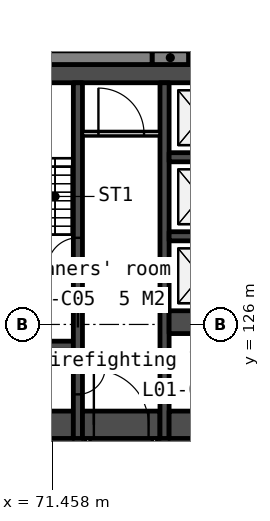
"""IFC4 building model, lengths in metres.
Left out: names, types, materials, properties, quantities, classifications, styles, units other than length and angle.
Written with IfcOpenShell. Run it as: python <this file> out.ifc"""

import sys

from ifc_helpers import new_model, si_unit, direction, frame, frame_2d, origin, place, context, subcontext, project, spatial, rectangle, extrude, element, fill, save


model = new_model("IFC4")
c1 = context("Model", 3, precision=1e-05, world=origin(), true_north=direction((0.0, 1.0)))
c2 = subcontext(c1, "Body", "Model", "MODEL_VIEW")
j1 = project(units=[si_unit("LENGTHUNIT", "METRE"), si_unit("PLANEANGLEUNIT", "RADIAN")], contexts=[c1])
p1 = place(None, origin())
s1 = spatial("IfcSite", under=j1, at=p1, CompositionType="ELEMENT")
p2 = place(p1, origin())
s2 = spatial("IfcBuilding", under=s1, at=p2, CompositionType="ELEMENT")
p3 = place(p2, frame((0.0, 0.0, 7.5)))
s3 = spatial("IfcBuildingStorey", under=s2, at=p3, CompositionType="ELEMENT", Elevation=7.5)
p4 = place(p3, frame((66.0, 134.25, 0.0), z_axis=(0.0, 0.0, 1.0), x_axis=(1.0, 0.0, 0.0)))
e1 = element("IfcWall", 1, at=p4, inside=s3, PredefinedType="SOLIDWALL", context=c2, shape_type="SweptSolid", body=[
    extrude(rectangle(XDim=28.0, YDim=0.6, at=frame_2d((14.0, 0.0))), origin(), (0.0, 0.0, 1.0), 5.7),
])
for number, where, z_axis, x_axis in (
    (2, (69.6, 127.6, 0.0), (0.0, 0.0, 1.0), (1.0, 0.0, 0.0)),
    (3, (69.6, 125.3, 0.0), (0.0, 0.0, 1.0), (1.0, 0.0, 0.0)),
):
    element("IfcWall", number, at=place(p3, frame(where, z_axis=z_axis, x_axis=x_axis)), inside=s3, PredefinedType="SOLIDWALL", context=c2, shape_type="SweptSolid", body=[
        extrude(rectangle(XDim=2.55, YDim=0.3, at=frame_2d((1.275, 0.0))), origin(), (0.0, 0.0, 1.0), 5.7),
    ])
p5 = place(p3, frame((69.6, 122.7, 0.0), z_axis=(0.0, 0.0, 1.0), x_axis=(1.0, 0.0, 0.0)))
e4 = element("IfcWall", 4, at=p5, inside=s3, PredefinedType="SOLIDWALL", context=c2, shape_type="SweptSolid", body=[
    extrude(rectangle(XDim=2.55, YDim=0.9, at=frame_2d((1.275, 0.0))), origin(), (0.0, 0.0, 1.0), 5.7),
])
p6 = place(p3, frame((72.3, 133.95, 0.0), z_axis=(0.0, 0.0, 1.0), x_axis=(0.0, -1.0, 0.0)))
e5 = element("IfcWall", 5, at=p6, inside=s3, PredefinedType="SOLIDWALL", context=c2, shape_type="SweptSolid", body=[
    extrude(rectangle(XDim=11.7, YDim=0.3, at=frame_2d((5.85, 0.0))), origin(), (0.0, 0.0, 1.0), 5.7),
])
p7 = place(p6, frame((6.95, 0.0, 0.0)))
e6 = element("IfcOpeningElement", 6, at=p7, cuts=e5, PredefinedType="OPENING", context=c2, shape_type="SweptSolid", body=[
    extrude(rectangle(XDim=1.1, YDim=2.1, at=frame_2d((0.55, 1.05))), frame((0.0, 0.16, 0.0), z_axis=(0.0, -1.0, 0.0), x_axis=(1.0, 0.0, 0.0)), (0.0, 0.0, 1.0), 0.32),
])
p8 = place(p6, frame((9.35, 0.0, 0.0)))
e7 = element("IfcOpeningElement", 7, at=p8, cuts=e5, PredefinedType="OPENING", context=c2, shape_type="SweptSolid", body=[
    extrude(rectangle(XDim=0.9, YDim=2.1, at=frame_2d((0.45, 1.05))), frame((0.0, 0.16, 0.0), z_axis=(0.0, -1.0, 0.0), x_axis=(1.0, 0.0, 0.0)), (0.0, 0.0, 1.0), 0.32),
])
p9 = place(p6, frame((5.1, 0.0, 0.0)))
e8 = element("IfcOpeningElement", 8, at=p9, cuts=e5, PredefinedType="OPENING", context=c2, shape_type="SweptSolid", body=[
    extrude(rectangle(XDim=1.0, YDim=2.1, at=frame_2d((0.5, 1.05))), frame((0.0, 0.16, 0.0), z_axis=(0.0, -1.0, 0.0), x_axis=(1.0, 0.0, 0.0)), (0.0, 0.0, 1.0), 0.32),
])
p10 = place(p3, frame((72.45, 132.275, 0.0), z_axis=(0.0, 0.0, 1.0), x_axis=(1.0, 0.0, 0.0)))
e9 = element("IfcWall", 9, at=p10, inside=s3, PredefinedType="PARTITIONING", context=c2, shape_type="SweptSolid", body=[
    extrude(rectangle(XDim=2.55, YDim=0.15, at=frame_2d((1.275, 0.0))), origin(), (0.0, 0.0, 1.0), 5.7),
])
p11 = place(p10, frame((0.525, 0.0, 0.0)))
e10 = element("IfcOpeningElement", 10, at=p11, cuts=e9, PredefinedType="OPENING", context=c2, shape_type="SweptSolid", body=[
    extrude(rectangle(XDim=1.5, YDim=2.1, at=frame_2d((0.75, 1.05))), frame((0.0, 0.085, 0.0), z_axis=(0.0, -1.0, 0.0), x_axis=(1.0, 0.0, 0.0)), (0.0, 0.0, 1.0), 0.17),
])
p12 = place(p3, frame((72.45, 122.7, 0.0), z_axis=(0.0, 0.0, 1.0), x_axis=(1.0, 0.0, 0.0)))
e11 = element("IfcWall", 11, at=p12, inside=s3, PredefinedType="SOLIDWALL", context=c2, shape_type="SweptSolid", body=[
    extrude(rectangle(XDim=2.55, YDim=0.9, at=frame_2d((1.275, 0.0))), origin(), (0.0, 0.0, 1.0), 5.7),
])
p13 = place(p12, frame((0.375, 0.0, 0.0)))
e12 = element("IfcOpeningElement", 12, at=p13, cuts=e11, PredefinedType="OPENING", context=c2, shape_type="SweptSolid", body=[
    extrude(rectangle(XDim=1.8, YDim=2.1, at=frame_2d((0.9, 1.05))), frame((0.0, 0.46, 0.0), z_axis=(0.0, -1.0, 0.0), x_axis=(1.0, 0.0, 0.0)), (0.0, 0.0, 1.0), 0.92),
])
for number, where, z_axis, x_axis in (
    (13, (72.625, 122.25, 0.0), (0.0, 0.0, 1.0), (0.0, -1.0, 0.0)),
    (14, (74.825, 122.25, 0.0), (0.0, 0.0, 1.0), (0.0, -1.0, 0.0)),
):
    element("IfcWall", number, at=place(p3, frame(where, z_axis=z_axis, x_axis=x_axis)), inside=s3, PredefinedType="PARTITIONING", context=c2, shape_type="SweptSolid", body=[
        extrude(rectangle(XDim=2.1, YDim=0.15, at=frame_2d((1.05, 0.0))), origin(), (0.0, 0.0, 1.0), 5.7),
    ])
p14 = place(p3, frame((75.15, 133.95, 0.0), z_axis=(0.0, 0.0, 1.0), x_axis=(0.0, -1.0, 0.0)))
e15 = element("IfcWall", 15, at=p14, inside=s3, PredefinedType="SOLIDWALL", context=c2, shape_type="SweptSolid", body=[
    extrude(rectangle(XDim=11.7, YDim=0.3, at=frame_2d((5.85, 0.0))), origin(), (0.0, 0.0, 1.0), 5.7),
])
for number, where, z_axis, x_axis in (
    (16, (75.3, 131.5, 0.0), (0.0, 0.0, 1.0), (1.0, 0.0, 0.0)),
    (17, (75.3, 128.9, 0.0), (0.0, 0.0, 1.0), (1.0, 0.0, 0.0)),
):
    element("IfcWall", number, at=place(p3, frame(where, z_axis=z_axis, x_axis=x_axis)), inside=s3, PredefinedType="SOLIDWALL", context=c2, shape_type="SweptSolid", body=[
        extrude(rectangle(XDim=2.1, YDim=0.3, at=frame_2d((1.05, 0.0))), origin(), (0.0, 0.0, 1.0), 5.7),
    ])
p15 = place(p3, frame((75.3, 126.075, 0.0), z_axis=(0.0, 0.0, 1.0), x_axis=(1.0, 0.0, 0.0)))
e18 = element("IfcWall", 18, at=p15, inside=s3, PredefinedType="SOLIDWALL", context=c2, shape_type="SweptSolid", body=[
    extrude(rectangle(XDim=2.1, YDim=0.75, at=frame_2d((1.05, 0.0))), origin(), (0.0, 0.0, 1.0), 5.7),
])
p16 = place(p3, frame((75.3, 122.7, 0.0), z_axis=(0.0, 0.0, 1.0), x_axis=(1.0, 0.0, 0.0)))
e19 = element("IfcWall", 19, at=p16, inside=s3, PredefinedType="SOLIDWALL", context=c2, shape_type="SweptSolid", body=[
    extrude(rectangle(XDim=6.2, YDim=0.9, at=frame_2d((3.1, 0.0))), origin(), (0.0, 0.0, 1.0), 5.7),
])
p17 = place(p3, frame((84.061, 134.775, -0.3), z_axis=(0.0, 0.0, 1.0), x_axis=(-1.0, 0.0, 0.0)))
e20 = element("IfcWall", 20, at=p17, inside=s3, PredefinedType="SOLIDWALL", context=c2, shape_type="SweptSolid", body=[
    extrude(rectangle(XDim=8.122, YDim=0.45, at=frame_2d((4.061, 0.0))), origin(), (0.0, 0.0, 1.0), 5.312),
])
p18 = place(p3, frame((75.939, 134.775, -0.3), z_axis=(0.0, 0.0, 1.0), x_axis=(-1.0, 0.0, 0.0)))
e21 = element("IfcWall", 21, at=p18, inside=s3, PredefinedType="SOLIDWALL", context=c2, shape_type="SweptSolid", body=[
    extrude(rectangle(XDim=1.2, YDim=0.45, at=frame_2d((0.6, 0.0))), origin(), (0.0, 0.0, 1.0), 5.312),
])
p19 = place(p3, frame((74.739, 134.775, -0.3), z_axis=(0.0, 0.0, 1.0), x_axis=(-1.0, 0.0, 0.0)))
e22 = element("IfcWall", 22, at=p19, inside=s3, PredefinedType="SOLIDWALL", context=c2, shape_type="SweptSolid", body=[
    extrude(rectangle(XDim=8.121, YDim=0.45, at=frame_2d((4.061, 0.0))), origin(), (0.0, 0.0, 1.0), 5.312),
])
p20 = place(p7, origin())
e23 = element("IfcDoor", 23, at=p20, inside=s3, OperationType="SLIDING_TO_LEFT", PredefinedType="DOOR", context=c2, shape_type="SweptSolid", body=[
    extrude(rectangle(XDim=1.1, YDim=2.1, at=frame_2d((0.55, 1.05))), frame((0.0, 0.025, 0.0), z_axis=(0.0, -1.0, 0.0), x_axis=(1.0, 0.0, 0.0)), (0.0, 0.0, 1.0), 0.05),
])
fill(e6, e23)
p21 = place(p13, origin())
e24 = element("IfcDoor", 24, at=p21, inside=s3, OperationType="DOUBLE_DOOR_DOUBLE_SWING", PredefinedType="DOOR", context=c2, shape_type="SweptSolid", body=[
    extrude(rectangle(XDim=1.8, YDim=2.1, at=frame_2d((0.9, 1.05))), frame((0.0, 0.025, 0.0), z_axis=(0.0, -1.0, 0.0), x_axis=(1.0, 0.0, 0.0)), (0.0, 0.0, 1.0), 0.05),
])
fill(e12, e24)
p22 = place(p11, origin())
e25 = element("IfcDoor", 25, at=p22, inside=s3, OperationType="DOUBLE_DOOR_DOUBLE_SWING", PredefinedType="DOOR", context=c2, shape_type="SweptSolid", body=[
    extrude(rectangle(XDim=1.5, YDim=2.1, at=frame_2d((0.75, 1.05))), frame((0.0, 0.025, 0.0), z_axis=(0.0, -1.0, 0.0), x_axis=(1.0, 0.0, 0.0)), (0.0, 0.0, 1.0), 0.05),
])
fill(e10, e25)
p23 = place(p8, origin())
e26 = element("IfcDoor", 26, at=p23, inside=s3, OperationType="SINGLE_SWING_LEFT", PredefinedType="DOOR", context=c2, shape_type="SweptSolid", body=[
    extrude(rectangle(XDim=0.9, YDim=2.1, at=frame_2d((0.45, 1.05))), frame((0.0, 0.025, 0.0), z_axis=(0.0, -1.0, 0.0), x_axis=(1.0, 0.0, 0.0)), (0.0, 0.0, 1.0), 0.05),
])
fill(e7, e26)
p24 = place(p9, origin())
e27 = element("IfcDoor", 27, at=p24, inside=s3, OperationType="SINGLE_SWING_RIGHT", PredefinedType="DOOR", context=c2, shape_type="SweptSolid", body=[
    extrude(rectangle(XDim=1.0, YDim=2.1, at=frame_2d((0.5, 1.05))), frame((0.0, 0.025, 0.0), z_axis=(0.0, -1.0, 0.0), x_axis=(1.0, 0.0, 0.0)), (0.0, 0.0, 1.0), 0.05),
])
fill(e8, e27)
save(model, sys.argv[1])
